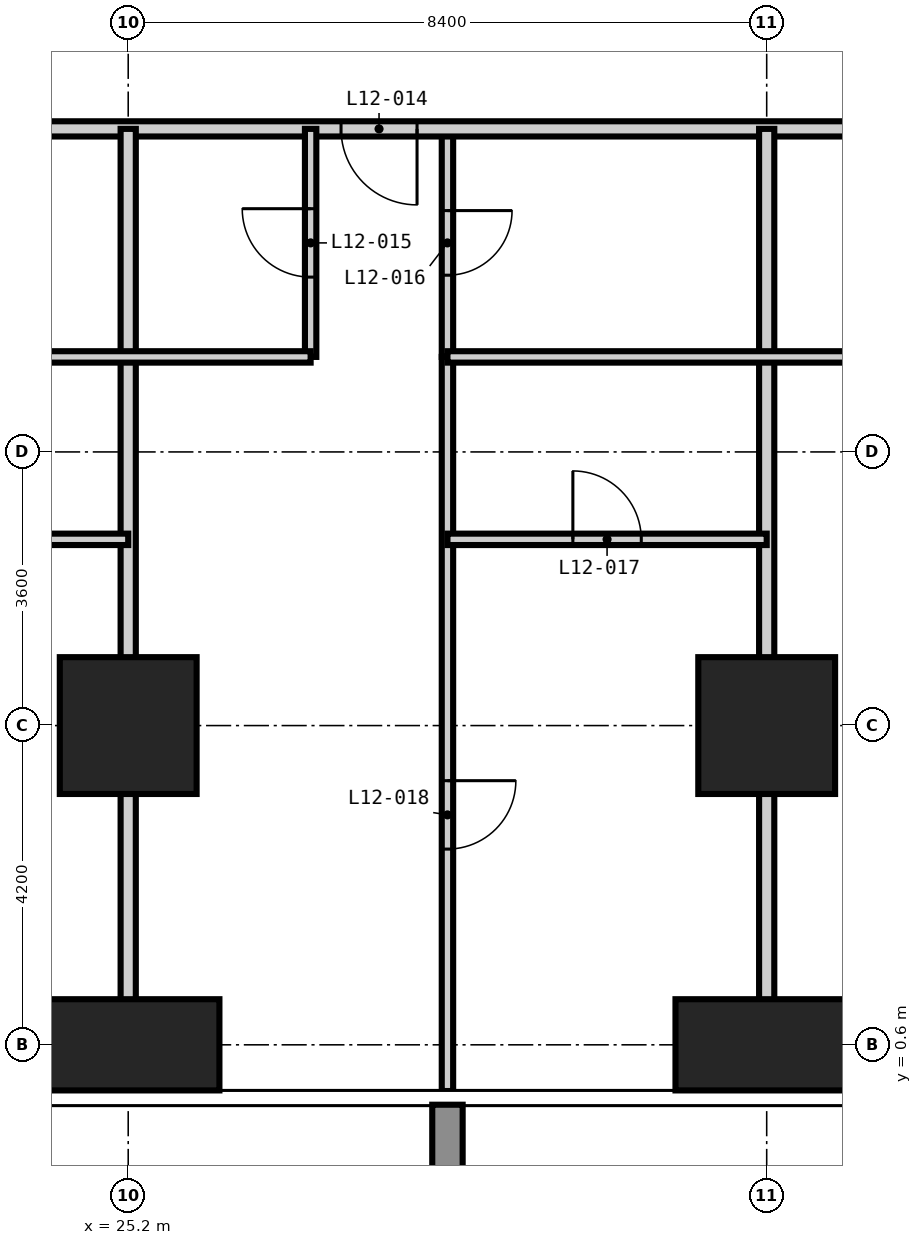
"""IFC4 building model, lengths in metres.
Left out: names, types, materials, properties, quantities, classifications, styles, units other than length and angle.
Written with IfcOpenShell. Run it as: python <this file> out.ifc"""

import sys

from ifc_helpers import new_model, si_unit, direction, frame, frame_2d, origin, origin_2d, place, context, subcontext, project, spatial, rectangle, extrude, element, fill, save


model = new_model("IFC4")
c1 = context("Model", 3, precision=1e-05, world=origin(), true_north=direction((0.0, 1.0)))
c2 = subcontext(c1, "Body", "Model", "MODEL_VIEW")
j1 = project(units=[si_unit("LENGTHUNIT", "METRE"), si_unit("PLANEANGLEUNIT", "RADIAN")], contexts=[c1])
p1 = place(None, origin())
s1 = spatial("IfcSite", under=j1, at=p1, CompositionType="ELEMENT")
p2 = place(p1, origin())
s2 = spatial("IfcBuilding", under=s1, at=p2, CompositionType="ELEMENT")
p3 = place(p2, frame((0.0, 0.0, 52.2)))
s3 = spatial("IfcBuildingStorey", under=s2, at=p3, CompositionType="ELEMENT", Elevation=52.2)
p4 = place(p3, frame((25.2, 0.6, -0.35), z_axis=(0.0, 0.0, 1.0), x_axis=(1.0, 0.0, 0.0)))
e1 = element("IfcColumn", 1, at=p4, inside=s3, PredefinedType="COLUMN", context=c2, shape_type="SweptSolid", body=[
    extrude(rectangle(XDim=2.4, YDim=1.2, at=origin_2d()), origin(), (0.0, 0.0, 1.0), 3.6),
])
p5 = place(p3, frame((25.2, 4.8, -0.35), z_axis=(0.0, 0.0, 1.0), x_axis=(1.0, 0.0, 0.0)))
e2 = element("IfcColumn", 2, at=p5, inside=s3, PredefinedType="COLUMN", context=c2, shape_type="SweptSolid", body=[
    extrude(rectangle(XDim=1.8, YDim=1.8, at=origin_2d()), origin(), (0.0, 0.0, 1.0), 3.6),
])
p6 = place(p3, frame((33.6, 0.6, -0.35), z_axis=(0.0, 0.0, 1.0), x_axis=(1.0, 0.0, 0.0)))
e3 = element("IfcColumn", 3, at=p6, inside=s3, PredefinedType="COLUMN", context=c2, shape_type="SweptSolid", body=[
    extrude(rectangle(XDim=2.4, YDim=1.2, at=origin_2d()), origin(), (0.0, 0.0, 1.0), 3.6),
])
p7 = place(p3, frame((33.6, 4.8, -0.35), z_axis=(0.0, 0.0, 1.0), x_axis=(1.0, 0.0, 0.0)))
e4 = element("IfcColumn", 4, at=p7, inside=s3, PredefinedType="COLUMN", context=c2, shape_type="SweptSolid", body=[
    extrude(rectangle(XDim=1.8, YDim=1.8, at=origin_2d()), origin(), (0.0, 0.0, 1.0), 3.6),
])
p8 = place(p3, frame((29.4, 9.65, 0.0), z_axis=(0.0, 0.0, 1.0), x_axis=(0.0, 1.0, 0.0)))
e5 = element("IfcWall", 5, at=p8, inside=s3, PredefinedType="PARTITIONING", context=c2, shape_type="SweptSolid", body=[
    extrude(rectangle(XDim=3.0, YDim=0.15, at=frame_2d((1.5, 0.0))), origin(), (0.0, 0.0, 1.0), 3.25),
])
p9 = place(p8, frame((1.075, 0.0, 0.0)))
e6 = element("IfcOpeningElement", 6, at=p9, cuts=e5, PredefinedType="OPENING", context=c2, shape_type="SweptSolid", body=[
    extrude(rectangle(XDim=0.85, YDim=2.1, at=frame_2d((0.425, 1.05))), frame((0.0, 0.085, 0.0), z_axis=(0.0, -1.0, 0.0), x_axis=(1.0, 0.0, 0.0)), (0.0, 0.0, 1.0), 0.17),
])
p10 = place(p3, frame((44.95, 12.65, 0.0), z_axis=(0.0, 0.0, 1.0), x_axis=(-1.0, 0.0, 0.0)))
e7 = element("IfcWall", 7, at=p10, inside=s3, PredefinedType="PARTITIONING", context=c2, shape_type="SweptSolid", body=[
    extrude(rectangle(XDim=32.3, YDim=0.2, at=frame_2d((16.15, 0.0))), origin(), (0.0, 0.0, 1.0), 3.25),
])
p11 = place(p10, frame((24.35, 0.0, 0.0)))
e8 = element("IfcOpeningElement", 8, at=p11, cuts=e7, PredefinedType="OPENING", context=c2, shape_type="SweptSolid", body=[
    extrude(rectangle(XDim=1.0, YDim=2.2, at=frame_2d((0.5, 1.1))), frame((0.0, 0.11, 0.0), z_axis=(0.0, -1.0, 0.0), x_axis=(1.0, 0.0, 0.0)), (0.0, 0.0, 1.0), 0.22),
])
p12 = place(p10, frame((15.95, 0.0, 0.0)))
e9 = element("IfcOpeningElement", 9, at=p12, cuts=e7, PredefinedType="OPENING", context=c2, shape_type="SweptSolid", body=[
    extrude(rectangle(XDim=1.0, YDim=2.2, at=frame_2d((0.5, 1.1))), frame((0.0, 0.11, 0.0), z_axis=(0.0, -1.0, 0.0), x_axis=(1.0, 0.0, 0.0)), (0.0, 0.0, 1.0), 0.22),
])
p13 = place(p10, frame((7.55, 0.0, 0.0)))
e10 = element("IfcOpeningElement", 10, at=p13, cuts=e7, PredefinedType="OPENING", context=c2, shape_type="SweptSolid", body=[
    extrude(rectangle(XDim=1.0, YDim=2.2, at=frame_2d((0.5, 1.1))), frame((0.0, 0.11, 0.0), z_axis=(0.0, -1.0, 0.0), x_axis=(1.0, 0.0, 0.0)), (0.0, 0.0, 1.0), 0.22),
])
for number, where, z_axis, x_axis in (
    (11, (25.2, -0.008, 0.0), (0.0, 0.0, 1.0), (0.0, 1.0, 0.0)),
    (12, (33.6, -0.008, 0.0), (0.0, 0.0, 1.0), (0.0, 1.0, 0.0)),
):
    element("IfcWall", number, at=place(p3, frame(where, z_axis=z_axis, x_axis=x_axis)), inside=s3, PredefinedType="PARTITIONING", context=c2, shape_type="SweptSolid", body=[
        extrude(rectangle(XDim=12.658, YDim=0.2, at=frame_2d((6.329, 0.0))), origin(), (0.0, 0.0, 1.0), 3.25),
    ])
p14 = place(p3, frame((27.6, 9.65, 0.0), z_axis=(0.0, 0.0, 1.0), x_axis=(0.0, 1.0, 0.0)))
e13 = element("IfcWall", 13, at=p14, inside=s3, PredefinedType="PARTITIONING", context=c2, shape_type="SweptSolid", body=[
    extrude(rectangle(XDim=3.0, YDim=0.15, at=frame_2d((1.5, 0.0))), origin(), (0.0, 0.0, 1.0), 3.25),
])
p15 = place(p14, frame((1.05, 0.0, 0.0)))
e14 = element("IfcOpeningElement", 14, at=p15, cuts=e13, PredefinedType="OPENING", context=c2, shape_type="SweptSolid", body=[
    extrude(rectangle(XDim=0.9, YDim=2.1, at=frame_2d((0.45, 1.05))), frame((0.0, 0.085, 0.0), z_axis=(0.0, -1.0, 0.0), x_axis=(1.0, 0.0, 0.0)), (0.0, 0.0, 1.0), 0.17),
])
p16 = place(p3, frame((29.4, -0.008, 0.0), z_axis=(0.0, 0.0, 1.0), x_axis=(0.0, 1.0, 0.0)))
e15 = element("IfcWall", 15, at=p16, inside=s3, PredefinedType="PARTITIONING", context=c2, shape_type="SweptSolid", body=[
    extrude(rectangle(XDim=9.658, YDim=0.15, at=frame_2d((4.829, 0.0))), origin(), (0.0, 0.0, 1.0), 3.25),
])
p17 = place(p16, frame((3.183, 0.0, 0.0)))
e16 = element("IfcOpeningElement", 16, at=p17, cuts=e15, PredefinedType="OPENING", context=c2, shape_type="SweptSolid", body=[
    extrude(rectangle(XDim=0.9, YDim=2.1, at=frame_2d((0.45, 1.05))), frame((0.0, 0.085, 0.0), z_axis=(0.0, -1.0, 0.0), x_axis=(1.0, 0.0, 0.0)), (0.0, 0.0, 1.0), 0.17),
])
p18 = place(p3, frame((21.0, 7.25, 0.0), z_axis=(0.0, 0.0, 1.0), x_axis=(1.0, 0.0, 0.0)))
e17 = element("IfcWall", 17, at=p18, inside=s3, PredefinedType="PARTITIONING", context=c2, shape_type="SweptSolid", body=[
    extrude(rectangle(XDim=4.2, YDim=0.15, at=frame_2d((2.1, 0.0))), origin(), (0.0, 0.0, 1.0), 3.25),
])
p19 = place(p18, frame((1.65, 0.0, 0.0)))
e18 = element("IfcOpeningElement", 18, at=p19, cuts=e17, PredefinedType="OPENING", context=c2, shape_type="SweptSolid", body=[
    extrude(rectangle(XDim=0.9, YDim=2.1, at=frame_2d((0.45, 1.05))), frame((0.0, 0.085, 0.0), z_axis=(0.0, -1.0, 0.0), x_axis=(1.0, 0.0, 0.0)), (0.0, 0.0, 1.0), 0.17),
])
p20 = place(p3, frame((29.4, 7.25, 0.0), z_axis=(0.0, 0.0, 1.0), x_axis=(1.0, 0.0, 0.0)))
e19 = element("IfcWall", 19, at=p20, inside=s3, PredefinedType="PARTITIONING", context=c2, shape_type="SweptSolid", body=[
    extrude(rectangle(XDim=4.2, YDim=0.15, at=frame_2d((2.1, 0.0))), origin(), (0.0, 0.0, 1.0), 3.25),
])
p21 = place(p20, frame((1.65, 0.0, 0.0)))
e20 = element("IfcOpeningElement", 20, at=p21, cuts=e19, PredefinedType="OPENING", context=c2, shape_type="SweptSolid", body=[
    extrude(rectangle(XDim=0.9, YDim=2.1, at=frame_2d((0.45, 1.05))), frame((0.0, 0.085, 0.0), z_axis=(0.0, -1.0, 0.0), x_axis=(1.0, 0.0, 0.0)), (0.0, 0.0, 1.0), 0.17),
])
for number, where, z_axis, x_axis in (
    (21, (21.0, 9.65, 0.0), (0.0, 0.0, 1.0), (1.0, 0.0, 0.0)),
    (22, (29.4, 9.65, 0.0), (0.0, 0.0, 1.0), (1.0, 0.0, 0.0)),
):
    element("IfcWall", number, at=place(p3, frame(where, z_axis=z_axis, x_axis=x_axis)), inside=s3, PredefinedType="PARTITIONING", context=c2, shape_type="SweptSolid", body=[
        extrude(rectangle(XDim=6.6, YDim=0.15, at=frame_2d((3.3, 0.0))), origin(), (0.0, 0.0, 1.0), 3.25),
    ])
p22 = place(p12, origin())
e23 = element("IfcDoor", 23, at=p22, inside=s3, OperationType="SINGLE_SWING_LEFT", PredefinedType="DOOR", context=c2, shape_type="SweptSolid", body=[
    extrude(rectangle(XDim=1.0, YDim=2.2, at=frame_2d((0.5, 1.1))), frame((0.0, 0.025, 0.0), z_axis=(0.0, -1.0, 0.0), x_axis=(1.0, 0.0, 0.0)), (0.0, 0.0, 1.0), 0.05),
])
fill(e9, e23)
p23 = place(p15, origin())
e24 = element("IfcDoor", 24, at=p23, inside=s3, OperationType="SINGLE_SWING_RIGHT", PredefinedType="DOOR", context=c2, shape_type="SweptSolid", body=[
    extrude(rectangle(XDim=0.9, YDim=2.1, at=frame_2d((0.45, 1.05))), frame((0.0, 0.025, 0.0), z_axis=(0.0, -1.0, 0.0), x_axis=(1.0, 0.0, 0.0)), (0.0, 0.0, 1.0), 0.05),
])
fill(e14, e24)
p24 = place(p9, frame((0.85, 0.0, 0.0), z_axis=(0.0, 0.0, 1.0), x_axis=(-1.0, 0.0, 0.0)))
e25 = element("IfcDoor", 25, at=p24, inside=s3, OperationType="SINGLE_SWING_LEFT", PredefinedType="DOOR", context=c2, shape_type="SweptSolid", body=[
    extrude(rectangle(XDim=0.85, YDim=2.1, at=frame_2d((0.425, 1.05))), frame((0.0, 0.025, 0.0), z_axis=(0.0, -1.0, 0.0), x_axis=(1.0, 0.0, 0.0)), (0.0, 0.0, 1.0), 0.05),
])
fill(e6, e25)
p25 = place(p21, origin())
e26 = element("IfcDoor", 26, at=p25, inside=s3, OperationType="SINGLE_SWING_LEFT", PredefinedType="DOOR", context=c2, shape_type="SweptSolid", body=[
    extrude(rectangle(XDim=0.9, YDim=2.1, at=frame_2d((0.45, 1.05))), frame((0.0, 0.025, 0.0), z_axis=(0.0, -1.0, 0.0), x_axis=(1.0, 0.0, 0.0)), (0.0, 0.0, 1.0), 0.05),
])
fill(e20, e26)
p26 = place(p17, frame((0.9, 0.0, 0.0), z_axis=(0.0, 0.0, 1.0), x_axis=(-1.0, 0.0, 0.0)))
e27 = element("IfcDoor", 27, at=p26, inside=s3, OperationType="SINGLE_SWING_LEFT", PredefinedType="DOOR", context=c2, shape_type="SweptSolid", body=[
    extrude(rectangle(XDim=0.9, YDim=2.1, at=frame_2d((0.45, 1.05))), frame((0.0, 0.025, 0.0), z_axis=(0.0, -1.0, 0.0), x_axis=(1.0, 0.0, 0.0)), (0.0, 0.0, 1.0), 0.05),
])
fill(e16, e27)
save(model, sys.argv[1])
